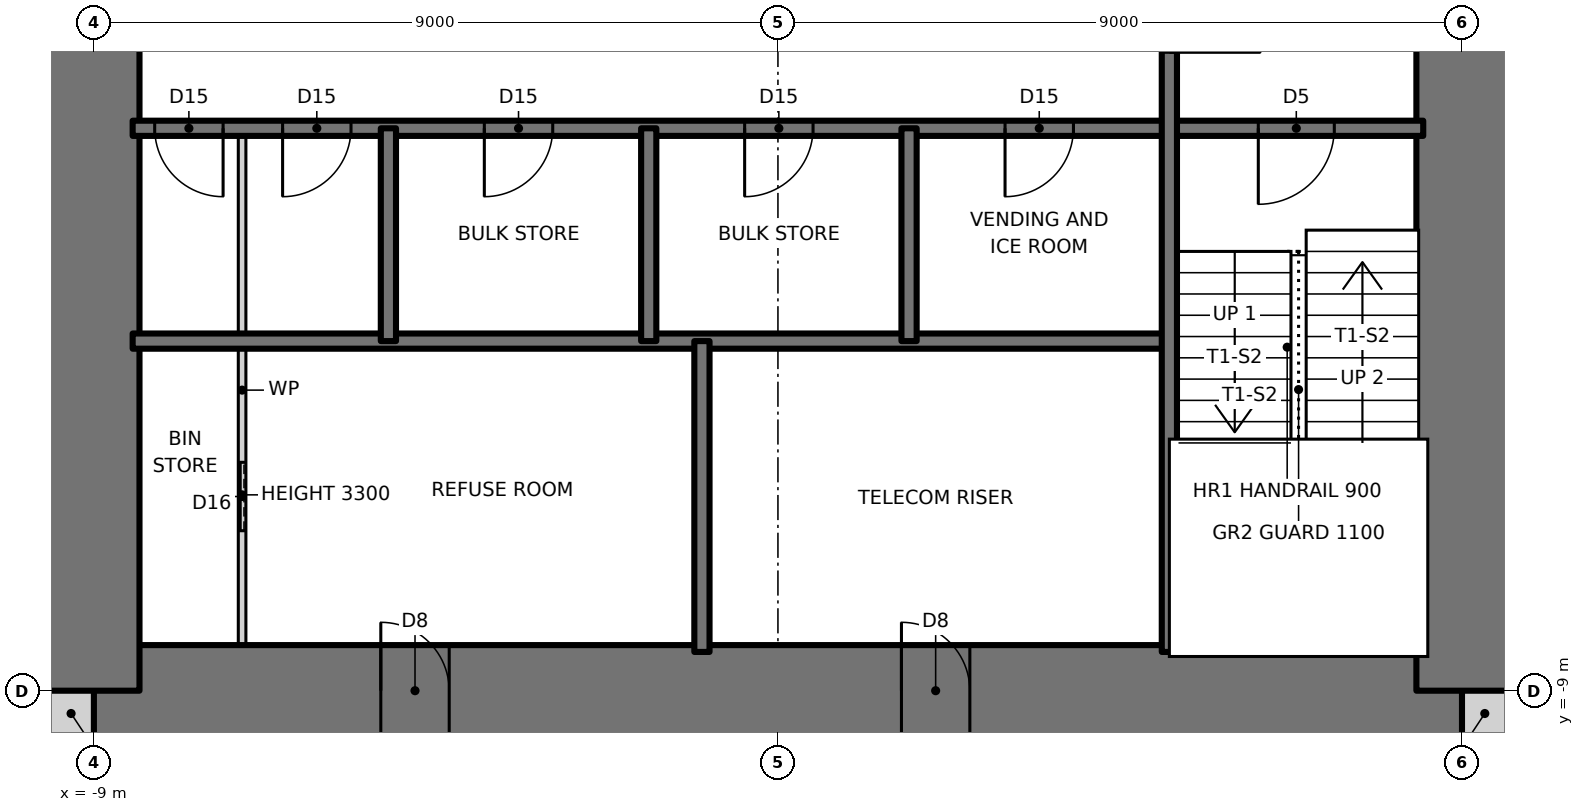
"""IFC4 building model, lengths in metres.
Left out: names, types, materials, properties, quantities, classifications, styles, units other than length and angle.
Written with IfcOpenShell. Run it as: python <this file> out.ifc"""

import sys

from ifc_helpers import new_model, si_unit, direction, frame, frame_2d, origin, place, context, subcontext, project, spatial, rectangle, extrude, element, fill, save


model = new_model("IFC4")
c1 = context("Model", 3, precision=1e-05, world=origin(), true_north=direction((0.0, 1.0)))
c2 = subcontext(c1, "Body", "Model", "MODEL_VIEW")
j1 = project(units=[si_unit("LENGTHUNIT", "METRE"), si_unit("PLANEANGLEUNIT", "RADIAN")], contexts=[c1])
p1 = place(None, origin())
s1 = spatial("IfcSite", under=j1, at=p1, CompositionType="ELEMENT")
p2 = place(p1, origin())
s2 = spatial("IfcBuilding", under=s1, at=p2, CompositionType="ELEMENT")
p3 = place(p2, frame((0.0, 0.0, 195.0)))
s3 = spatial("IfcBuildingStorey", under=s2, at=p3, CompositionType="ELEMENT", Elevation=195.0)
for number, where, z_axis, x_axis in (
    (1, (-9.6, -9.3, 0.0), (0.0, 0.0, 1.0), (1.0, 0.0, 0.0)),
    (2, (9.0, -9.3, 0.0), (0.0, 0.0, 1.0), (1.0, 0.0, 0.0)),
):
    element("IfcWall", number, at=place(p3, frame(where, z_axis=z_axis, x_axis=x_axis)), inside=s3, PredefinedType="SOLIDWALL", context=c2, shape_type="SweptSolid", body=[
        extrude(rectangle(XDim=0.6, YDim=0.6, at=frame_2d((0.3, 0.0))), origin(), (0.0, 0.0, 1.0), 3.5),
    ])
p4 = place(p3, frame((-9.0, -9.0, 0.0), z_axis=(0.0, 0.0, 1.0), x_axis=(1.0, 0.0, 0.0)))
e3 = element("IfcWall", 3, at=p4, inside=s3, PredefinedType="SHEAR", context=c2, shape_type="SweptSolid", body=[
    extrude(rectangle(XDim=18.0, YDim=1.2, at=frame_2d((9.0, 0.0))), origin(), (0.0, 0.0, 1.0), 3.5),
])
p5 = place(p4, frame((3.775, 0.0, 0.0)))
e4 = element("IfcOpeningElement", 4, at=p5, cuts=e3, PredefinedType="OPENING", context=c2, shape_type="SweptSolid", body=[
    extrude(rectangle(XDim=0.9, YDim=2.1, at=frame_2d((0.45, 1.05))), frame((0.0, 0.61, 0.0), z_axis=(0.0, -1.0, 0.0), x_axis=(1.0, 0.0, 0.0)), (0.0, 0.0, 1.0), 1.22),
])
p6 = place(p4, frame((10.625, 0.0, 0.0)))
e5 = element("IfcOpeningElement", 5, at=p6, cuts=e3, PredefinedType="OPENING", context=c2, shape_type="SweptSolid", body=[
    extrude(rectangle(XDim=0.9, YDim=2.1, at=frame_2d((0.45, 1.05))), frame((0.0, 0.61, 0.0), z_axis=(0.0, -1.0, 0.0), x_axis=(1.0, 0.0, 0.0)), (0.0, 0.0, 1.0), 1.22),
])
p7 = place(p3, frame((9.0, -9.0, 0.0), z_axis=(0.0, 0.0, 1.0), x_axis=(0.0, 1.0, 0.0)))
e6 = element("IfcWall", 6, at=p7, inside=s3, PredefinedType="SHEAR", context=c2, shape_type="SweptSolid", body=[
    extrude(rectangle(XDim=18.0, YDim=1.2, at=frame_2d((9.0, 0.0))), origin(), (0.0, 0.0, 1.0), 3.5),
])
p8 = place(p7, frame((8.5, 0.0, 0.0)))
e7 = element("IfcOpeningElement", 7, at=p8, cuts=e6, PredefinedType="OPENING", context=c2, shape_type="SweptSolid", body=[
    extrude(rectangle(XDim=1.0, YDim=2.1, at=frame_2d((0.5, 1.05))), frame((0.0, 0.61, 0.0), z_axis=(0.0, -1.0, 0.0), x_axis=(1.0, 0.0, 0.0)), (0.0, 0.0, 1.0), 1.22),
])
p9 = place(p3, frame((-9.0, 9.0, 0.0), z_axis=(0.0, 0.0, 1.0), x_axis=(0.0, -1.0, 0.0)))
e8 = element("IfcWall", 8, at=p9, inside=s3, PredefinedType="SHEAR", context=c2, shape_type="SweptSolid", body=[
    extrude(rectangle(XDim=18.0, YDim=1.2, at=frame_2d((9.0, 0.0))), origin(), (0.0, 0.0, 1.0), 3.5),
])
p10 = place(p9, frame((8.5, 0.0, 0.0)))
e9 = element("IfcOpeningElement", 9, at=p10, cuts=e8, PredefinedType="OPENING", context=c2, shape_type="SweptSolid", body=[
    extrude(rectangle(XDim=1.0, YDim=2.1, at=frame_2d((0.5, 1.05))), frame((0.0, 0.61, 0.0), z_axis=(0.0, -1.0, 0.0), x_axis=(1.0, 0.0, 0.0)), (0.0, 0.0, 1.0), 1.22),
])
p11 = place(p3, frame((-8.49, -4.4, 0.0), z_axis=(0.0, 0.0, 1.0), x_axis=(1.0, 0.0, 0.0)))
e10 = element("IfcWall", 10, at=p11, inside=s3, PredefinedType="SOLIDWALL", context=c2, shape_type="SweptSolid", body=[
    extrude(rectangle(XDim=13.64, YDim=0.2, at=frame_2d((6.82, 0.0))), origin(), (0.0, 0.0, 1.0), 3.5),
])
p12 = place(p3, frame((-8.49, -1.6, 0.0), z_axis=(0.0, 0.0, 1.0), x_axis=(1.0, 0.0, 0.0)))
e11 = element("IfcWall", 11, at=p12, inside=s3, PredefinedType="SOLIDWALL", context=c2, shape_type="SweptSolid", body=[
    extrude(rectangle(XDim=16.98, YDim=0.2, at=frame_2d((8.49, 0.0))), origin(), (0.0, 0.0, 1.0), 3.5),
])
p13 = place(p12, frame((14.81, 0.0, 0.0)))
e12 = element("IfcOpeningElement", 12, at=p13, cuts=e11, PredefinedType="OPENING", context=c2, shape_type="SweptSolid", body=[
    extrude(rectangle(XDim=1.0, YDim=2.1, at=frame_2d((0.5, 1.05))), frame((0.0, 0.11, 0.0), z_axis=(0.0, -1.0, 0.0), x_axis=(1.0, 0.0, 0.0)), (0.0, 0.0, 1.0), 0.22),
])
p14 = place(p12, frame((1.973, 0.0, 0.0)))
e13 = element("IfcOpeningElement", 13, at=p14, cuts=e11, PredefinedType="OPENING", context=c2, shape_type="SweptSolid", body=[
    extrude(rectangle(XDim=0.9, YDim=2.1, at=frame_2d((0.45, 1.05))), frame((0.0, 0.11, 0.0), z_axis=(0.0, -1.0, 0.0), x_axis=(1.0, 0.0, 0.0)), (0.0, 0.0, 1.0), 0.22),
])
p15 = place(p12, frame((0.29, 0.0, 0.0)))
e14 = element("IfcOpeningElement", 14, at=p15, cuts=e11, PredefinedType="OPENING", context=c2, shape_type="SweptSolid", body=[
    extrude(rectangle(XDim=0.9, YDim=2.1, at=frame_2d((0.45, 1.05))), frame((0.0, 0.11, 0.0), z_axis=(0.0, -1.0, 0.0), x_axis=(1.0, 0.0, 0.0)), (0.0, 0.0, 1.0), 0.22),
])
p16 = place(p12, frame((4.627, 0.0, 0.0)))
e15 = element("IfcOpeningElement", 15, at=p16, cuts=e11, PredefinedType="OPENING", context=c2, shape_type="SweptSolid", body=[
    extrude(rectangle(XDim=0.9, YDim=2.1, at=frame_2d((0.45, 1.05))), frame((0.0, 0.11, 0.0), z_axis=(0.0, -1.0, 0.0), x_axis=(1.0, 0.0, 0.0)), (0.0, 0.0, 1.0), 0.22),
])
p17 = place(p12, frame((8.052, 0.0, 0.0)))
e16 = element("IfcOpeningElement", 16, at=p17, cuts=e11, PredefinedType="OPENING", context=c2, shape_type="SweptSolid", body=[
    extrude(rectangle(XDim=0.9, YDim=2.1, at=frame_2d((0.45, 1.05))), frame((0.0, 0.11, 0.0), z_axis=(0.0, -1.0, 0.0), x_axis=(1.0, 0.0, 0.0)), (0.0, 0.0, 1.0), 0.22),
])
p18 = place(p12, frame((11.478, 0.0, 0.0)))
e17 = element("IfcOpeningElement", 17, at=p18, cuts=e11, PredefinedType="OPENING", context=c2, shape_type="SweptSolid", body=[
    extrude(rectangle(XDim=0.9, YDim=2.1, at=frame_2d((0.45, 1.05))), frame((0.0, 0.11, 0.0), z_axis=(0.0, -1.0, 0.0), x_axis=(1.0, 0.0, 0.0)), (0.0, 0.0, 1.0), 0.22),
])
p19 = place(p3, frame((5.15, -8.49, 0.0), z_axis=(0.0, 0.0, 1.0), x_axis=(0.0, 1.0, 0.0)))
e18 = element("IfcWall", 18, at=p19, inside=s3, PredefinedType="SOLIDWALL", context=c2, shape_type="SweptSolid", body=[
    extrude(rectangle(XDim=13.09, YDim=0.2, at=frame_2d((6.545, 0.0))), origin(), (0.0, 0.0, 1.0), 3.5),
])
p20 = place(p19, frame((7.89, 0.0, 0.0)))
e19 = element("IfcOpeningElement", 19, at=p20, cuts=e18, PredefinedType="OPENING", context=c2, shape_type="SweptSolid", body=[
    extrude(rectangle(XDim=1.2, YDim=2.1, at=frame_2d((0.6, 1.05))), frame((0.0, 0.11, 0.0), z_axis=(0.0, -1.0, 0.0), x_axis=(1.0, 0.0, 0.0)), (0.0, 0.0, 1.0), 0.22),
])
p21 = place(p3, frame((1.725, -4.4, 0.0), z_axis=(0.0, 0.0, 1.0), x_axis=(0.0, 1.0, 0.0)))
e20 = element("IfcWall", 20, at=p21, inside=s3, PredefinedType="SOLIDWALL", context=c2, shape_type="SweptSolid", body=[
    extrude(rectangle(XDim=2.8, YDim=0.2, at=frame_2d((1.4, 0.0))), origin(), (0.0, 0.0, 1.0), 3.5),
])
p22 = place(p3, frame((-1.0, -8.49, 0.0), z_axis=(0.0, 0.0, 1.0), x_axis=(0.0, 1.0, 0.0)))
e21 = element("IfcWall", 21, at=p22, inside=s3, PredefinedType="SOLIDWALL", context=c2, shape_type="SweptSolid", body=[
    extrude(rectangle(XDim=4.09, YDim=0.2, at=frame_2d((2.045, 0.0))), origin(), (0.0, 0.0, 1.0), 3.5),
])
for number, where, z_axis, x_axis in (
    (22, (-1.7, -4.4, 0.0), (0.0, 0.0, 1.0), (0.0, 1.0, 0.0)),
    (23, (-5.125, -4.4, 0.0), (0.0, 0.0, 1.0), (0.0, 1.0, 0.0)),
):
    element("IfcWall", number, at=place(p3, frame(where, z_axis=z_axis, x_axis=x_axis)), inside=s3, PredefinedType="SOLIDWALL", context=c2, shape_type="SweptSolid", body=[
        extrude(rectangle(XDim=2.8, YDim=0.2, at=frame_2d((1.4, 0.0))), origin(), (0.0, 0.0, 1.0), 3.5),
    ])
p23 = place(p3, frame((-7.05, -8.49, 0.0), z_axis=(0.0, 0.0, 1.0), x_axis=(0.0, 1.0, 0.0)))
e24 = element("IfcWall", 24, at=p23, inside=s3, PredefinedType="PARTITIONING", context=c2, shape_type="SweptSolid", body=[
    extrude(rectangle(XDim=6.89, YDim=0.1, at=frame_2d((3.445, 0.0))), origin(), (0.0, 0.0, 1.0), 3.3),
])
p24 = place(p23, frame((1.595, 0.0, 0.0)))
e25 = element("IfcOpeningElement", 25, at=p24, cuts=e24, PredefinedType="OPENING", context=c2, shape_type="SweptSolid", body=[
    extrude(rectangle(XDim=0.9, YDim=2.1, at=frame_2d((0.45, 1.05))), frame((0.0, 0.06, 0.0), z_axis=(0.0, -1.0, 0.0), x_axis=(1.0, 0.0, 0.0)), (0.0, 0.0, 1.0), 0.12),
])
p25 = place(p13, frame((1.0, 0.0, 0.0), z_axis=(0.0, 0.0, 1.0), x_axis=(-1.0, 0.0, 0.0)))
e26 = element("IfcDoor", 26, at=p25, inside=s3, OperationType="SINGLE_SWING_RIGHT", PredefinedType="DOOR", context=c2, shape_type="SweptSolid", body=[
    extrude(rectangle(XDim=1.0, YDim=2.1, at=frame_2d((0.5, 1.05))), frame((0.0, 0.025, 0.0), z_axis=(0.0, -1.0, 0.0), x_axis=(1.0, 0.0, 0.0)), (0.0, 0.0, 1.0), 0.05),
])
fill(e12, e26)
p26 = place(p20, frame((1.2, 0.0, 0.0), z_axis=(0.0, 0.0, 1.0), x_axis=(-1.0, 0.0, 0.0)))
e27 = element("IfcDoor", 27, at=p26, inside=s3, OperationType="SINGLE_SWING_RIGHT", PredefinedType="DOOR", context=c2, shape_type="SweptSolid", body=[
    extrude(rectangle(XDim=1.2, YDim=2.1, at=frame_2d((0.6, 1.05))), frame((0.0, 0.025, 0.0), z_axis=(0.0, -1.0, 0.0), x_axis=(1.0, 0.0, 0.0)), (0.0, 0.0, 1.0), 0.05),
])
fill(e19, e27)
p27 = place(p14, frame((0.9, 0.0, 0.0), z_axis=(0.0, 0.0, 1.0), x_axis=(-1.0, 0.0, 0.0)))
e28 = element("IfcDoor", 28, at=p27, inside=s3, OperationType="SINGLE_SWING_RIGHT", PredefinedType="DOOR", context=c2, shape_type="SweptSolid", body=[
    extrude(rectangle(XDim=0.9, YDim=2.1, at=frame_2d((0.45, 1.05))), frame((0.0, 0.025, 0.0), z_axis=(0.0, -1.0, 0.0), x_axis=(1.0, 0.0, 0.0)), (0.0, 0.0, 1.0), 0.05),
])
fill(e13, e28)
p28 = place(p15, frame((0.9, 0.0, 0.0), z_axis=(0.0, 0.0, 1.0), x_axis=(-1.0, 0.0, 0.0)))
e29 = element("IfcDoor", 29, at=p28, inside=s3, OperationType="SINGLE_SWING_LEFT", PredefinedType="DOOR", context=c2, shape_type="SweptSolid", body=[
    extrude(rectangle(XDim=0.9, YDim=2.1, at=frame_2d((0.45, 1.05))), frame((0.0, 0.025, 0.0), z_axis=(0.0, -1.0, 0.0), x_axis=(1.0, 0.0, 0.0)), (0.0, 0.0, 1.0), 0.05),
])
fill(e14, e29)
p29 = place(p16, frame((0.9, 0.0, 0.0), z_axis=(0.0, 0.0, 1.0), x_axis=(-1.0, 0.0, 0.0)))
e30 = element("IfcDoor", 30, at=p29, inside=s3, OperationType="SINGLE_SWING_RIGHT", PredefinedType="DOOR", context=c2, shape_type="SweptSolid", body=[
    extrude(rectangle(XDim=0.9, YDim=2.1, at=frame_2d((0.45, 1.05))), frame((0.0, 0.025, 0.0), z_axis=(0.0, -1.0, 0.0), x_axis=(1.0, 0.0, 0.0)), (0.0, 0.0, 1.0), 0.05),
])
fill(e15, e30)
p30 = place(p17, frame((0.9, 0.0, 0.0), z_axis=(0.0, 0.0, 1.0), x_axis=(-1.0, 0.0, 0.0)))
e31 = element("IfcDoor", 31, at=p30, inside=s3, OperationType="SINGLE_SWING_RIGHT", PredefinedType="DOOR", context=c2, shape_type="SweptSolid", body=[
    extrude(rectangle(XDim=0.9, YDim=2.1, at=frame_2d((0.45, 1.05))), frame((0.0, 0.025, 0.0), z_axis=(0.0, -1.0, 0.0), x_axis=(1.0, 0.0, 0.0)), (0.0, 0.0, 1.0), 0.05),
])
fill(e16, e31)
p31 = place(p18, frame((0.9, 0.0, 0.0), z_axis=(0.0, 0.0, 1.0), x_axis=(-1.0, 0.0, 0.0)))
e32 = element("IfcDoor", 32, at=p31, inside=s3, OperationType="SINGLE_SWING_RIGHT", PredefinedType="DOOR", context=c2, shape_type="SweptSolid", body=[
    extrude(rectangle(XDim=0.9, YDim=2.1, at=frame_2d((0.45, 1.05))), frame((0.0, 0.025, 0.0), z_axis=(0.0, -1.0, 0.0), x_axis=(1.0, 0.0, 0.0)), (0.0, 0.0, 1.0), 0.05),
])
fill(e17, e32)
p32 = place(p24, origin())
e33 = element("IfcDoor", 33, at=p32, inside=s3, OperationType="SLIDING_TO_RIGHT", PredefinedType="DOOR", context=c2, shape_type="SweptSolid", body=[
    extrude(rectangle(XDim=0.9, YDim=2.1, at=frame_2d((0.45, 1.05))), frame((0.0, 0.025, 0.0), z_axis=(0.0, -1.0, 0.0), x_axis=(1.0, 0.0, 0.0)), (0.0, 0.0, 1.0), 0.05),
])
fill(e25, e33)
p33 = place(p5, origin())
e34 = element("IfcDoor", 34, at=p33, inside=s3, OperationType="SINGLE_SWING_LEFT", PredefinedType="DOOR", context=c2, shape_type="SweptSolid", body=[
    extrude(rectangle(XDim=0.9, YDim=2.1, at=frame_2d((0.45, 1.05))), frame((0.0, 0.025, 0.0), z_axis=(0.0, -1.0, 0.0), x_axis=(1.0, 0.0, 0.0)), (0.0, 0.0, 1.0), 0.05),
])
fill(e4, e34)
p34 = place(p6, origin())
e35 = element("IfcDoor", 35, at=p34, inside=s3, OperationType="SINGLE_SWING_LEFT", PredefinedType="DOOR", context=c2, shape_type="SweptSolid", body=[
    extrude(rectangle(XDim=0.9, YDim=2.1, at=frame_2d((0.45, 1.05))), frame((0.0, 0.025, 0.0), z_axis=(0.0, -1.0, 0.0), x_axis=(1.0, 0.0, 0.0)), (0.0, 0.0, 1.0), 0.05),
])
fill(e5, e35)
save(model, sys.argv[1])
